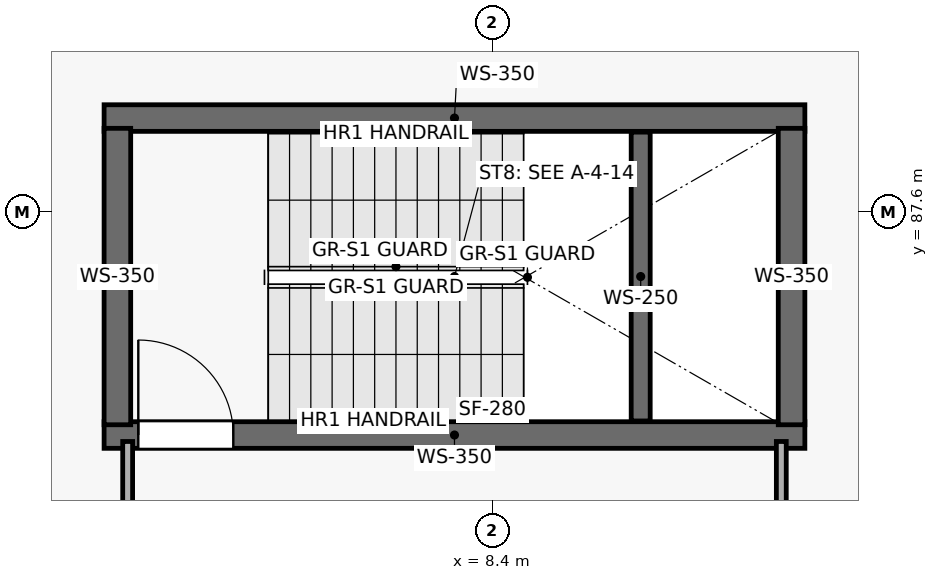
"""IFC4 building model, lengths in metres.
Left out: names, types, materials, properties, quantities, classifications, styles, units other than length and angle.
Written with IfcOpenShell. Run it as: python <this file> out.ifc"""

import sys

from ifc_helpers import new_model, si_unit, direction, frame, frame_2d, origin, place, context, subcontext, project, spatial, rectangle, extrude, element, fill, save


model = new_model("IFC4")
c1 = context("Model", 3, precision=1e-05, world=origin(), true_north=direction((0.0, 1.0)))
c2 = subcontext(c1, "Body", "Model", "MODEL_VIEW")
j1 = project(units=[si_unit("LENGTHUNIT", "METRE"), si_unit("PLANEANGLEUNIT", "RADIAN")], contexts=[c1])
p1 = place(None, origin())
s1 = spatial("IfcSite", under=j1, at=p1, CompositionType="ELEMENT")
p2 = place(p1, origin())
s2 = spatial("IfcBuilding", under=s1, at=p2, CompositionType="ELEMENT")
p3 = place(p2, frame((0.0, 0.0, 5.4)))
s3 = spatial("IfcBuildingStorey", under=s2, at=p3, CompositionType="ELEMENT", Elevation=5.4)
p4 = place(p3, frame((3.29, 84.665, 0.0), z_axis=(0.0, 0.0, 1.0), x_axis=(1.0, 0.0, 0.0)))
e1 = element("IfcWall", 1, at=p4, inside=s3, PredefinedType="SHEAR", context=c2, shape_type="SweptSolid", body=[
    extrude(rectangle(XDim=9.22, YDim=0.35, at=frame_2d((4.61, 0.0))), origin(), (0.0, 0.0, 1.0), 4.52),
])
p5 = place(p4, frame((0.45, 0.0, 0.0)))
e2 = element("IfcOpeningElement", 2, at=p5, cuts=e1, PredefinedType="OPENING", context=c2, shape_type="SweptSolid", body=[
    extrude(rectangle(XDim=1.25, YDim=2.2, at=frame_2d((0.625, 1.1))), frame((0.0, 0.185, 0.0), z_axis=(0.0, -1.0, 0.0), x_axis=(1.0, 0.0, 0.0)), (0.0, 0.0, 1.0), 0.37),
])
p6 = place(p3, frame((12.51, 88.835, 0.0), z_axis=(0.0, 0.0, 1.0), x_axis=(-1.0, 0.0, 0.0)))
e3 = element("IfcWall", 3, at=p6, inside=s3, PredefinedType="SHEAR", context=c2, shape_type="SweptSolid", body=[
    extrude(rectangle(XDim=9.22, YDim=0.35, at=frame_2d((4.61, 0.0))), origin(), (0.0, 0.0, 1.0), 4.52),
])
for number, where, z_axis, x_axis in (
    (4, (3.465, 84.8, 0.0), (0.0, 0.0, 1.0), (0.0, 1.0, 0.0)),
    (5, (12.335, 88.7, 0.0), (0.0, 0.0, 1.0), (0.0, -1.0, 0.0)),
):
    element("IfcWall", number, at=place(p3, frame(where, z_axis=z_axis, x_axis=x_axis)), inside=s3, PredefinedType="SHEAR", context=c2, shape_type="SweptSolid", body=[
        extrude(rectangle(XDim=3.9, YDim=0.35, at=frame_2d((1.95, 0.0))), origin(), (0.0, 0.0, 1.0), 4.52),
    ])
p7 = place(p3, frame((10.35, 84.85, 0.0), z_axis=(0.0, 0.0, 1.0), x_axis=(0.0, 1.0, 0.0)))
e6 = element("IfcWall", 6, at=p7, inside=s3, PredefinedType="SHEAR", context=c2, shape_type="SweptSolid", body=[
    extrude(rectangle(XDim=3.8, YDim=0.25, at=frame_2d((1.9, 0.0))), origin(), (0.0, 0.0, 1.0), 2.22),
])
p8 = place(p3, frame((12.2, 81.8, 0.0), z_axis=(0.0, 0.0, 1.0), x_axis=(0.0, 1.0, 0.0)))
e7 = element("IfcWall", 7, at=p8, inside=s3, PredefinedType="PARTITIONING", context=c2, shape_type="SweptSolid", body=[
    extrude(rectangle(XDim=2.78, YDim=0.13, at=frame_2d((1.39, 0.0))), origin(), (0.0, 0.0, 1.0), 4.52),
])
p9 = place(p3, frame((3.6, 84.58, 0.0), z_axis=(0.0, 0.0, 1.0), x_axis=(0.0, -1.0, 0.0)))
e8 = element("IfcWall", 8, at=p9, inside=s3, PredefinedType="PARTITIONING", context=c2, shape_type="SweptSolid", body=[
    extrude(rectangle(XDim=2.635, YDim=0.13, at=frame_2d((1.317, 0.0))), origin(), (0.0, 0.0, 1.0), 4.52),
])
p10 = place(p5, origin())
e9 = element("IfcDoor", 9, at=p10, inside=s3, OperationType="SINGLE_SWING_LEFT", PredefinedType="DOOR", context=c2, shape_type="SweptSolid", body=[
    extrude(rectangle(XDim=1.25, YDim=2.2, at=frame_2d((0.625, 1.1))), frame((0.0, 0.025, 0.0), z_axis=(0.0, -1.0, 0.0), x_axis=(1.0, 0.0, 0.0)), (0.0, 0.0, 1.0), 0.05),
])
fill(e2, e9)
save(model, sys.argv[1])
